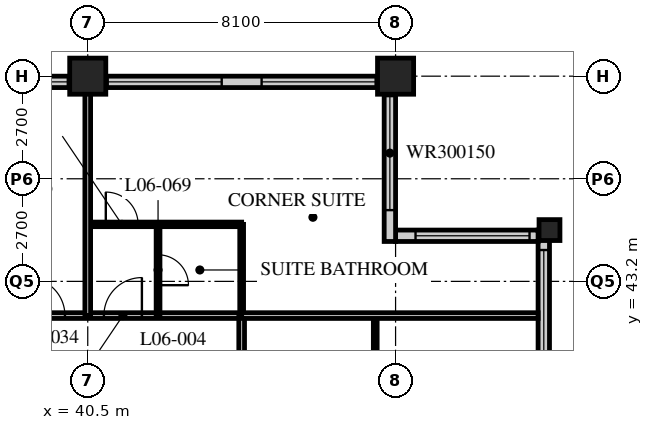
"""IFC4 building model, lengths in metres.
Left out: names, types, materials, properties, quantities, classifications, styles, units other than length and angle.
Written with IfcOpenShell. Run it as: python <this file> out.ifc"""

import sys

from ifc_helpers import new_model, si_unit, direction, frame, frame_2d, origin, origin_2d, place, context, subcontext, project, spatial, rectangle, hollow_rectangle, extrude, element, fill, save


model = new_model("IFC4")
c1 = context("Model", 3, precision=1e-05, world=origin(), true_north=direction((0.0, 1.0)))
c2 = subcontext(c1, "Body", "Model", "MODEL_VIEW")
j1 = project(units=[si_unit("LENGTHUNIT", "METRE"), si_unit("PLANEANGLEUNIT", "RADIAN")], contexts=[c1])
p1 = place(None, origin())
s1 = spatial("IfcSite", under=j1, at=p1, CompositionType="ELEMENT")
p2 = place(p1, origin())
s2 = spatial("IfcBuilding", under=s1, at=p2, CompositionType="ELEMENT")
p3 = place(p2, frame((0.0, 0.0, 33.0)))
s3 = spatial("IfcBuildingStorey", under=s2, at=p3, CompositionType="ELEMENT", Elevation=33.0)
for number, where, z_axis, x_axis in (
    (1, (40.5, 48.6, 0.0), (0.0, 0.0, 1.0), (1.0, 0.0, 0.0)),
    (2, (48.6, 48.6, 0.0), (0.0, 0.0, 1.0), (1.0, 0.0, 0.0)),
):
    element("IfcColumn", number, at=place(p3, frame(where, z_axis=z_axis, x_axis=x_axis)), inside=s3, PredefinedType="COLUMN", context=c2, shape_type="SweptSolid", body=[
        extrude(hollow_rectangle(XDim=0.95, YDim=0.95, WallThickness=0.095, at=origin_2d()), origin(), (0.0, 0.0, 1.0), 3.4),
    ])
p4 = place(p3, frame((52.65, 44.55, 0.0), z_axis=(0.0, 0.0, 1.0), x_axis=(1.0, 0.0, 0.0)))
e3 = element("IfcColumn", 3, at=p4, inside=s3, PredefinedType="COLUMN", context=c2, shape_type="SweptSolid", body=[
    extrude(hollow_rectangle(XDim=0.55, YDim=0.55, WallThickness=0.05, at=origin_2d()), origin(), (0.0, 0.0, 1.0), 3.4),
])
p5 = place(p3, frame((52.5, 40.2, 0.0), z_axis=(0.0, 0.0, 1.0), x_axis=(0.0, 1.0, 0.0)))
e4 = element("IfcWall", 4, at=p5, inside=s3, PredefinedType="SOLIDWALL", context=c2, shape_type="SweptSolid", body=[
    extrude(rectangle(XDim=4.35, YDim=0.3, at=frame_2d((2.175, 0.0))), origin(), (0.0, 0.0, 1.0), 3.19),
])
p6 = place(p5, frame((0.825, 0.0, 0.9)))
e5 = element("IfcOpeningElement", 5, at=p6, cuts=e4, PredefinedType="OPENING", context=c2, shape_type="SweptSolid", body=[
    extrude(rectangle(XDim=3.0, YDim=1.5, at=frame_2d((1.5, 0.75))), frame((0.0, 0.16, 0.0), z_axis=(0.0, -1.0, 0.0), x_axis=(1.0, 0.0, 0.0)), (0.0, 0.0, 1.0), 0.32),
])
p7 = place(p3, frame((52.35, 44.4, 0.0), z_axis=(0.0, 0.0, 1.0), x_axis=(-1.0, 0.0, 0.0)))
e6 = element("IfcWall", 6, at=p7, inside=s3, PredefinedType="SOLIDWALL", context=c2, shape_type="SweptSolid", body=[
    extrude(rectangle(XDim=3.75, YDim=0.3, at=frame_2d((1.875, 0.0))), origin(), (0.0, 0.0, 1.0), 3.19),
])
p8 = place(p7, frame((0.225, 0.0, 0.9)))
e7 = element("IfcOpeningElement", 7, at=p8, cuts=e6, PredefinedType="OPENING", context=c2, shape_type="SweptSolid", body=[
    extrude(rectangle(XDim=3.0, YDim=1.5, at=frame_2d((1.5, 0.75))), frame((0.0, 0.16, 0.0), z_axis=(0.0, -1.0, 0.0), x_axis=(1.0, 0.0, 0.0)), (0.0, 0.0, 1.0), 0.32),
])
p9 = place(p3, frame((48.45, 44.25, 0.0), z_axis=(0.0, 0.0, 1.0), x_axis=(0.0, 1.0, 0.0)))
e8 = element("IfcWall", 8, at=p9, inside=s3, PredefinedType="SOLIDWALL", context=c2, shape_type="SweptSolid", body=[
    extrude(rectangle(XDim=4.35, YDim=0.3, at=frame_2d((2.175, 0.0))), origin(), (0.0, 0.0, 1.0), 3.19),
])
p10 = place(p9, frame((0.825, 0.0, 0.9)))
e9 = element("IfcOpeningElement", 9, at=p10, cuts=e8, PredefinedType="OPENING", context=c2, shape_type="SweptSolid", body=[
    extrude(rectangle(XDim=3.0, YDim=1.5, at=frame_2d((1.5, 0.75))), frame((0.0, 0.16, 0.0), z_axis=(0.0, -1.0, 0.0), x_axis=(1.0, 0.0, 0.0)), (0.0, 0.0, 1.0), 0.32),
])
p11 = place(p3, frame((48.3, 48.45, 0.0), z_axis=(0.0, 0.0, 1.0), x_axis=(-1.0, 0.0, 0.0)))
e10 = element("IfcWall", 10, at=p11, inside=s3, PredefinedType="SOLIDWALL", context=c2, shape_type="SweptSolid", body=[
    extrude(rectangle(XDim=40.2, YDim=0.3, at=frame_2d((20.1, 0.0))), origin(), (0.0, 0.0, 1.0), 3.19),
])
p12 = place(p11, frame((0.225, 0.0, 0.9)))
e11 = element("IfcOpeningElement", 11, at=p12, cuts=e10, PredefinedType="OPENING", context=c2, shape_type="SweptSolid", body=[
    extrude(rectangle(XDim=3.0, YDim=2.0, at=frame_2d((1.5, 1.0))), frame((0.0, 0.16, 0.0), z_axis=(0.0, -1.0, 0.0), x_axis=(1.0, 0.0, 0.0)), (0.0, 0.0, 1.0), 0.32),
])
p13 = place(p11, frame((4.275, 0.0, 0.9)))
e12 = element("IfcOpeningElement", 12, at=p13, cuts=e10, PredefinedType="OPENING", context=c2, shape_type="SweptSolid", body=[
    extrude(rectangle(XDim=3.0, YDim=2.0, at=frame_2d((1.5, 1.0))), frame((0.0, 0.16, 0.0), z_axis=(0.0, -1.0, 0.0), x_axis=(1.0, 0.0, 0.0)), (0.0, 0.0, 1.0), 0.32),
])
p14 = place(p11, frame((8.325, 0.0, 0.9)))
e13 = element("IfcOpeningElement", 13, at=p14, cuts=e10, PredefinedType="OPENING", context=c2, shape_type="SweptSolid", body=[
    extrude(rectangle(XDim=3.0, YDim=2.0, at=frame_2d((1.5, 1.0))), frame((0.0, 0.16, 0.0), z_axis=(0.0, -1.0, 0.0), x_axis=(1.0, 0.0, 0.0)), (0.0, 0.0, 1.0), 0.32),
])
p15 = place(p11, frame((12.375, 0.0, 0.9)))
e14 = element("IfcOpeningElement", 14, at=p15, cuts=e10, PredefinedType="OPENING", context=c2, shape_type="SweptSolid", body=[
    extrude(rectangle(XDim=3.0, YDim=2.0, at=frame_2d((1.5, 1.0))), frame((0.0, 0.16, 0.0), z_axis=(0.0, -1.0, 0.0), x_axis=(1.0, 0.0, 0.0)), (0.0, 0.0, 1.0), 0.32),
])
p16 = place(p11, frame((16.425, 0.0, 0.9)))
e15 = element("IfcOpeningElement", 15, at=p16, cuts=e10, PredefinedType="OPENING", context=c2, shape_type="SweptSolid", body=[
    extrude(rectangle(XDim=3.0, YDim=2.0, at=frame_2d((1.5, 1.0))), frame((0.0, 0.16, 0.0), z_axis=(0.0, -1.0, 0.0), x_axis=(1.0, 0.0, 0.0)), (0.0, 0.0, 1.0), 0.32),
])
p17 = place(p11, frame((20.475, 0.0, 0.9)))
e16 = element("IfcOpeningElement", 16, at=p17, cuts=e10, PredefinedType="OPENING", context=c2, shape_type="SweptSolid", body=[
    extrude(rectangle(XDim=3.0, YDim=2.0, at=frame_2d((1.5, 1.0))), frame((0.0, 0.16, 0.0), z_axis=(0.0, -1.0, 0.0), x_axis=(1.0, 0.0, 0.0)), (0.0, 0.0, 1.0), 0.32),
])
p18 = place(p11, frame((24.525, 0.0, 0.9)))
e17 = element("IfcOpeningElement", 17, at=p18, cuts=e10, PredefinedType="OPENING", context=c2, shape_type="SweptSolid", body=[
    extrude(rectangle(XDim=3.0, YDim=2.0, at=frame_2d((1.5, 1.0))), frame((0.0, 0.16, 0.0), z_axis=(0.0, -1.0, 0.0), x_axis=(1.0, 0.0, 0.0)), (0.0, 0.0, 1.0), 0.32),
])
p19 = place(p11, frame((28.575, 0.0, 0.9)))
e18 = element("IfcOpeningElement", 18, at=p19, cuts=e10, PredefinedType="OPENING", context=c2, shape_type="SweptSolid", body=[
    extrude(rectangle(XDim=3.0, YDim=2.0, at=frame_2d((1.5, 1.0))), frame((0.0, 0.16, 0.0), z_axis=(0.0, -1.0, 0.0), x_axis=(1.0, 0.0, 0.0)), (0.0, 0.0, 1.0), 0.32),
])
p20 = place(p11, frame((32.625, 0.0, 0.9)))
e19 = element("IfcOpeningElement", 19, at=p20, cuts=e10, PredefinedType="OPENING", context=c2, shape_type="SweptSolid", body=[
    extrude(rectangle(XDim=3.0, YDim=2.0, at=frame_2d((1.5, 1.0))), frame((0.0, 0.16, 0.0), z_axis=(0.0, -1.0, 0.0), x_axis=(1.0, 0.0, 0.0)), (0.0, 0.0, 1.0), 0.32),
])
p21 = place(p11, frame((36.675, 0.0, 0.9)))
e20 = element("IfcOpeningElement", 20, at=p21, cuts=e10, PredefinedType="OPENING", context=c2, shape_type="SweptSolid", body=[
    extrude(rectangle(XDim=3.0, YDim=2.0, at=frame_2d((1.5, 1.0))), frame((0.0, 0.16, 0.0), z_axis=(0.0, -1.0, 0.0), x_axis=(1.0, 0.0, 0.0)), (0.0, 0.0, 1.0), 0.32),
])
p22 = place(p3, frame((12.15, 42.3, 0.0), z_axis=(0.0, 0.0, 1.0), x_axis=(1.0, 0.0, 0.0)))
e21 = element("IfcWall", 21, at=p22, inside=s3, PredefinedType="PARTITIONING", context=c2, shape_type="SweptSolid", body=[
    extrude(rectangle(XDim=32.4, YDim=0.15, at=frame_2d((16.2, 0.0))), origin(), (0.0, 0.0, 1.0), 3.19),
])
p23 = place(p22, frame((6.5, 0.0, 0.0)))
e22 = element("IfcOpeningElement", 22, at=p23, cuts=e21, PredefinedType="OPENING", context=c2, shape_type="SweptSolid", body=[
    extrude(rectangle(XDim=1.0, YDim=2.1, at=frame_2d((0.5, 1.05))), frame((0.0, 0.085, 0.0), z_axis=(0.0, -1.0, 0.0), x_axis=(1.0, 0.0, 0.0)), (0.0, 0.0, 1.0), 0.17),
])
p24 = place(p22, frame((8.4, 0.0, 0.0)))
e23 = element("IfcOpeningElement", 23, at=p24, cuts=e21, PredefinedType="OPENING", context=c2, shape_type="SweptSolid", body=[
    extrude(rectangle(XDim=1.0, YDim=2.1, at=frame_2d((0.5, 1.05))), frame((0.0, 0.085, 0.0), z_axis=(0.0, -1.0, 0.0), x_axis=(1.0, 0.0, 0.0)), (0.0, 0.0, 1.0), 0.17),
])
p25 = place(p22, frame((14.6, 0.0, 0.0)))
e24 = element("IfcOpeningElement", 24, at=p25, cuts=e21, PredefinedType="OPENING", context=c2, shape_type="SweptSolid", body=[
    extrude(rectangle(XDim=1.0, YDim=2.1, at=frame_2d((0.5, 1.05))), frame((0.0, 0.085, 0.0), z_axis=(0.0, -1.0, 0.0), x_axis=(1.0, 0.0, 0.0)), (0.0, 0.0, 1.0), 0.17),
])
p26 = place(p22, frame((18.65, 0.0, 0.0)))
e25 = element("IfcOpeningElement", 25, at=p26, cuts=e21, PredefinedType="OPENING", context=c2, shape_type="SweptSolid", body=[
    extrude(rectangle(XDim=1.0, YDim=2.1, at=frame_2d((0.5, 1.05))), frame((0.0, 0.085, 0.0), z_axis=(0.0, -1.0, 0.0), x_axis=(1.0, 0.0, 0.0)), (0.0, 0.0, 1.0), 0.17),
])
p27 = place(p22, frame((23.0, 0.0, 0.0)))
e26 = element("IfcOpeningElement", 26, at=p27, cuts=e21, PredefinedType="OPENING", context=c2, shape_type="SweptSolid", body=[
    extrude(rectangle(XDim=1.0, YDim=2.1, at=frame_2d((0.5, 1.05))), frame((0.0, 0.085, 0.0), z_axis=(0.0, -1.0, 0.0), x_axis=(1.0, 0.0, 0.0)), (0.0, 0.0, 1.0), 0.17),
])
p28 = place(p22, frame((26.75, 0.0, 0.0)))
e27 = element("IfcOpeningElement", 27, at=p28, cuts=e21, PredefinedType="OPENING", context=c2, shape_type="SweptSolid", body=[
    extrude(rectangle(XDim=1.0, YDim=2.1, at=frame_2d((0.5, 1.05))), frame((0.0, 0.085, 0.0), z_axis=(0.0, -1.0, 0.0), x_axis=(1.0, 0.0, 0.0)), (0.0, 0.0, 1.0), 0.17),
])
p29 = place(p22, frame((28.775, 0.0, 0.0)))
e28 = element("IfcOpeningElement", 28, at=p29, cuts=e21, PredefinedType="OPENING", context=c2, shape_type="SweptSolid", body=[
    extrude(rectangle(XDim=1.0, YDim=2.1, at=frame_2d((0.5, 1.05))), frame((0.0, 0.085, 0.0), z_axis=(0.0, -1.0, 0.0), x_axis=(1.0, 0.0, 0.0)), (0.0, 0.0, 1.0), 0.17),
])
p30 = place(p22, frame((2.625, 0.0, 0.0)))
e29 = element("IfcOpeningElement", 29, at=p30, cuts=e21, PredefinedType="OPENING", context=c2, shape_type="SweptSolid", body=[
    extrude(rectangle(XDim=1.0, YDim=2.1, at=frame_2d((0.5, 1.05))), frame((0.0, 0.085, 0.0), z_axis=(0.0, -1.0, 0.0), x_axis=(1.0, 0.0, 0.0)), (0.0, 0.0, 1.0), 0.17),
])
p31 = place(p3, frame((44.55, 16.2, 0.0), z_axis=(0.0, 0.0, 1.0), x_axis=(0.0, 1.0, 0.0)))
e30 = element("IfcWall", 30, at=p31, inside=s3, PredefinedType="PARTITIONING", context=c2, shape_type="SweptSolid", body=[
    extrude(rectangle(XDim=26.1, YDim=0.15, at=frame_2d((13.05, 0.0))), origin(), (0.0, 0.0, 1.0), 3.19),
])
p32 = place(p31, frame((2.75, 0.0, 0.0)))
e31 = element("IfcOpeningElement", 31, at=p32, cuts=e30, PredefinedType="OPENING", context=c2, shape_type="SweptSolid", body=[
    extrude(rectangle(XDim=1.0, YDim=2.1, at=frame_2d((0.5, 1.05))), frame((0.0, 0.085, 0.0), z_axis=(0.0, -1.0, 0.0), x_axis=(1.0, 0.0, 0.0)), (0.0, 0.0, 1.0), 0.17),
])
p33 = place(p31, frame((4.35, 0.0, 0.0)))
e32 = element("IfcOpeningElement", 32, at=p33, cuts=e30, PredefinedType="OPENING", context=c2, shape_type="SweptSolid", body=[
    extrude(rectangle(XDim=1.0, YDim=2.1, at=frame_2d((0.5, 1.05))), frame((0.0, 0.085, 0.0), z_axis=(0.0, -1.0, 0.0), x_axis=(1.0, 0.0, 0.0)), (0.0, 0.0, 1.0), 0.17),
])
p34 = place(p31, frame((8.4, 0.0, 0.0)))
e33 = element("IfcOpeningElement", 33, at=p34, cuts=e30, PredefinedType="OPENING", context=c2, shape_type="SweptSolid", body=[
    extrude(rectangle(XDim=1.0, YDim=2.1, at=frame_2d((0.5, 1.05))), frame((0.0, 0.085, 0.0), z_axis=(0.0, -1.0, 0.0), x_axis=(1.0, 0.0, 0.0)), (0.0, 0.0, 1.0), 0.17),
])
p35 = place(p31, frame((14.6, 0.0, 0.0)))
e34 = element("IfcOpeningElement", 34, at=p35, cuts=e30, PredefinedType="OPENING", context=c2, shape_type="SweptSolid", body=[
    extrude(rectangle(XDim=1.0, YDim=2.1, at=frame_2d((0.5, 1.05))), frame((0.0, 0.085, 0.0), z_axis=(0.0, -1.0, 0.0), x_axis=(1.0, 0.0, 0.0)), (0.0, 0.0, 1.0), 0.17),
])
p36 = place(p31, frame((18.65, 0.0, 0.0)))
e35 = element("IfcOpeningElement", 35, at=p36, cuts=e30, PredefinedType="OPENING", context=c2, shape_type="SweptSolid", body=[
    extrude(rectangle(XDim=1.0, YDim=2.1, at=frame_2d((0.5, 1.05))), frame((0.0, 0.085, 0.0), z_axis=(0.0, -1.0, 0.0), x_axis=(1.0, 0.0, 0.0)), (0.0, 0.0, 1.0), 0.17),
])
p37 = place(p31, frame((22.65, 0.0, 0.0)))
e36 = element("IfcOpeningElement", 36, at=p37, cuts=e30, PredefinedType="OPENING", context=c2, shape_type="SweptSolid", body=[
    extrude(rectangle(XDim=1.0, YDim=2.1, at=frame_2d((0.5, 1.05))), frame((0.0, 0.085, 0.0), z_axis=(0.0, -1.0, 0.0), x_axis=(1.0, 0.0, 0.0)), (0.0, 0.0, 1.0), 0.17),
])
p38 = place(p3, frame((48.065, 40.0, 0.0), z_axis=(0.0, 0.0, 1.0), x_axis=(0.0, 1.0, 0.0)))
e37 = element("IfcWall", 37, at=p38, inside=s3, PredefinedType="PARTITIONING", context=c2, shape_type="SweptSolid", body=[
    extrude(rectangle(XDim=2.3, YDim=0.1, at=frame_2d((1.15, 0.0))), origin(), (0.0, 0.0, 1.0), 3.19),
])
p39 = place(p3, frame((40.5, 44.7, 0.0), z_axis=(0.0, 0.0, 1.0), x_axis=(1.0, 0.0, 0.0)))
e38 = element("IfcWall", 38, at=p39, inside=s3, PredefinedType="PARTITIONING", context=c2, shape_type="SweptSolid", body=[
    extrude(rectangle(XDim=4.05, YDim=0.12, at=frame_2d((2.025, 0.0))), origin(), (0.0, 0.0, 1.0), 3.19),
])
p40 = place(p39, frame((0.475, 0.0, 0.0)))
e39 = element("IfcOpeningElement", 39, at=p40, cuts=e38, PredefinedType="OPENING", context=c2, shape_type="SweptSolid", body=[
    extrude(rectangle(XDim=0.85, YDim=2.1, at=frame_2d((0.425, 1.05))), frame((0.0, 0.07, 0.0), z_axis=(0.0, -1.0, 0.0), x_axis=(1.0, 0.0, 0.0)), (0.0, 0.0, 1.0), 0.14),
])
p41 = place(p3, frame((42.35, 42.3, 0.0), z_axis=(0.0, 0.0, 1.0), x_axis=(0.0, 1.0, 0.0)))
e40 = element("IfcWall", 40, at=p41, inside=s3, PredefinedType="PARTITIONING", context=c2, shape_type="SweptSolid", body=[
    extrude(rectangle(XDim=2.4, YDim=0.1, at=frame_2d((1.2, 0.0))), origin(), (0.0, 0.0, 1.0), 3.19),
])
p42 = place(p41, frame((0.8, 0.0, 0.0)))
e41 = element("IfcOpeningElement", 41, at=p42, cuts=e40, PredefinedType="OPENING", context=c2, shape_type="SweptSolid", body=[
    extrude(rectangle(XDim=0.8, YDim=2.1, at=frame_2d((0.4, 1.05))), frame((0.0, 0.06, 0.0), z_axis=(0.0, -1.0, 0.0), x_axis=(1.0, 0.0, 0.0)), (0.0, 0.0, 1.0), 0.12),
])
p43 = place(p3, frame((44.55, 42.3, 0.0), z_axis=(0.0, 0.0, 1.0), x_axis=(0.0, 1.0, 0.0)))
e42 = element("IfcWall", 42, at=p43, inside=s3, PredefinedType="PARTITIONING", context=c2, shape_type="SweptSolid", body=[
    extrude(rectangle(XDim=2.4, YDim=0.1, at=frame_2d((1.2, 0.0))), origin(), (0.0, 0.0, 1.0), 3.19),
])
p44 = place(p3, frame((44.55, 42.3, 0.0), z_axis=(0.0, 0.0, 1.0), x_axis=(1.0, 0.0, 0.0)))
e43 = element("IfcWall", 43, at=p44, inside=s3, PredefinedType="PARTITIONING", context=c2, shape_type="SweptSolid", body=[
    extrude(rectangle(XDim=7.8, YDim=0.15, at=frame_2d((3.9, 0.0))), origin(), (0.0, 0.0, 1.0), 3.19),
])
p45 = place(p3, frame((40.5, 42.3, 0.0), z_axis=(0.0, 0.0, 1.0), x_axis=(0.0, 1.0, 0.0)))
e44 = element("IfcWall", 44, at=p45, inside=s3, PredefinedType="PARTITIONING", context=c2, shape_type="SweptSolid", body=[
    extrude(rectangle(XDim=6.0, YDim=0.15, at=frame_2d((3.0, 0.0))), origin(), (0.0, 0.0, 1.0), 2.578),
])
p46 = place(p6, origin())
e45 = element("IfcWindow", 45, at=p46, inside=s3, PartitioningType="SINGLE_PANEL", PredefinedType="WINDOW", context=c2, shape_type="SweptSolid", body=[
    extrude(rectangle(XDim=3.0, YDim=1.5, at=frame_2d((1.5, 0.75))), frame((0.0, 0.03, 0.0), z_axis=(0.0, -1.0, 0.0), x_axis=(1.0, 0.0, 0.0)), (0.0, 0.0, 1.0), 0.06),
])
fill(e5, e45)
p47 = place(p8, origin())
e46 = element("IfcWindow", 46, at=p47, inside=s3, PartitioningType="SINGLE_PANEL", PredefinedType="WINDOW", context=c2, shape_type="SweptSolid", body=[
    extrude(rectangle(XDim=3.0, YDim=1.5, at=frame_2d((1.5, 0.75))), frame((0.0, 0.03, 0.0), z_axis=(0.0, -1.0, 0.0), x_axis=(1.0, 0.0, 0.0)), (0.0, 0.0, 1.0), 0.06),
])
fill(e7, e46)
p48 = place(p10, origin())
e47 = element("IfcWindow", 47, at=p48, inside=s3, PartitioningType="SINGLE_PANEL", PredefinedType="WINDOW", context=c2, shape_type="SweptSolid", body=[
    extrude(rectangle(XDim=3.0, YDim=1.5, at=frame_2d((1.5, 0.75))), frame((0.0, 0.03, 0.0), z_axis=(0.0, -1.0, 0.0), x_axis=(1.0, 0.0, 0.0)), (0.0, 0.0, 1.0), 0.06),
])
fill(e9, e47)
p49 = place(p12, origin())
e48 = element("IfcWindow", 48, at=p49, inside=s3, PartitioningType="SINGLE_PANEL", PredefinedType="WINDOW", context=c2, shape_type="SweptSolid", body=[
    extrude(rectangle(XDim=3.0, YDim=2.0, at=frame_2d((1.5, 1.0))), frame((0.0, 0.03, 0.0), z_axis=(0.0, -1.0, 0.0), x_axis=(1.0, 0.0, 0.0)), (0.0, 0.0, 1.0), 0.06),
])
fill(e11, e48)
p50 = place(p13, origin())
e49 = element("IfcWindow", 49, at=p50, inside=s3, PartitioningType="SINGLE_PANEL", PredefinedType="WINDOW", context=c2, shape_type="SweptSolid", body=[
    extrude(rectangle(XDim=3.0, YDim=2.0, at=frame_2d((1.5, 1.0))), frame((0.0, 0.03, 0.0), z_axis=(0.0, -1.0, 0.0), x_axis=(1.0, 0.0, 0.0)), (0.0, 0.0, 1.0), 0.06),
])
fill(e12, e49)
p51 = place(p14, origin())
e50 = element("IfcWindow", 50, at=p51, inside=s3, PartitioningType="SINGLE_PANEL", PredefinedType="WINDOW", context=c2, shape_type="SweptSolid", body=[
    extrude(rectangle(XDim=3.0, YDim=2.0, at=frame_2d((1.5, 1.0))), frame((0.0, 0.03, 0.0), z_axis=(0.0, -1.0, 0.0), x_axis=(1.0, 0.0, 0.0)), (0.0, 0.0, 1.0), 0.06),
])
fill(e13, e50)
p52 = place(p28, origin())
e51 = element("IfcDoor", 51, at=p52, inside=s3, OperationType="SINGLE_SWING_LEFT", PredefinedType="DOOR", context=c2, shape_type="SweptSolid", body=[
    extrude(rectangle(XDim=1.0, YDim=2.1, at=frame_2d((0.5, 1.05))), frame((0.0, 0.025, 0.0), z_axis=(0.0, -1.0, 0.0), x_axis=(1.0, 0.0, 0.0)), (0.0, 0.0, 1.0), 0.05),
])
fill(e27, e51)
p53 = place(p42, origin())
e52 = element("IfcDoor", 52, at=p53, inside=s3, OperationType="SINGLE_SWING_RIGHT", PredefinedType="DOOR", context=c2, shape_type="SweptSolid", body=[
    extrude(rectangle(XDim=0.8, YDim=2.1, at=frame_2d((0.4, 1.05))), frame((0.0, 0.025, 0.0), z_axis=(0.0, -1.0, 0.0), x_axis=(1.0, 0.0, 0.0)), (0.0, 0.0, 1.0), 0.05),
])
fill(e41, e52)
p54 = place(p29, origin())
e53 = element("IfcDoor", 53, at=p54, inside=s3, OperationType="SINGLE_SWING_RIGHT", PredefinedType="DOOR", context=c2, shape_type="SweptSolid", body=[
    extrude(rectangle(XDim=1.0, YDim=2.1, at=frame_2d((0.5, 1.05))), frame((0.0, 0.025, 0.0), z_axis=(0.0, -1.0, 0.0), x_axis=(1.0, 0.0, 0.0)), (0.0, 0.0, 1.0), 0.05),
])
fill(e28, e53)
p55 = place(p40, origin())
e54 = element("IfcDoor", 54, at=p55, inside=s3, OperationType="SINGLE_SWING_LEFT", PredefinedType="DOOR", context=c2, shape_type="SweptSolid", body=[
    extrude(rectangle(XDim=0.85, YDim=2.1, at=frame_2d((0.425, 1.05))), frame((0.0, 0.025, 0.0), z_axis=(0.0, -1.0, 0.0), x_axis=(1.0, 0.0, 0.0)), (0.0, 0.0, 1.0), 0.05),
])
fill(e39, e54)
save(model, sys.argv[1])
